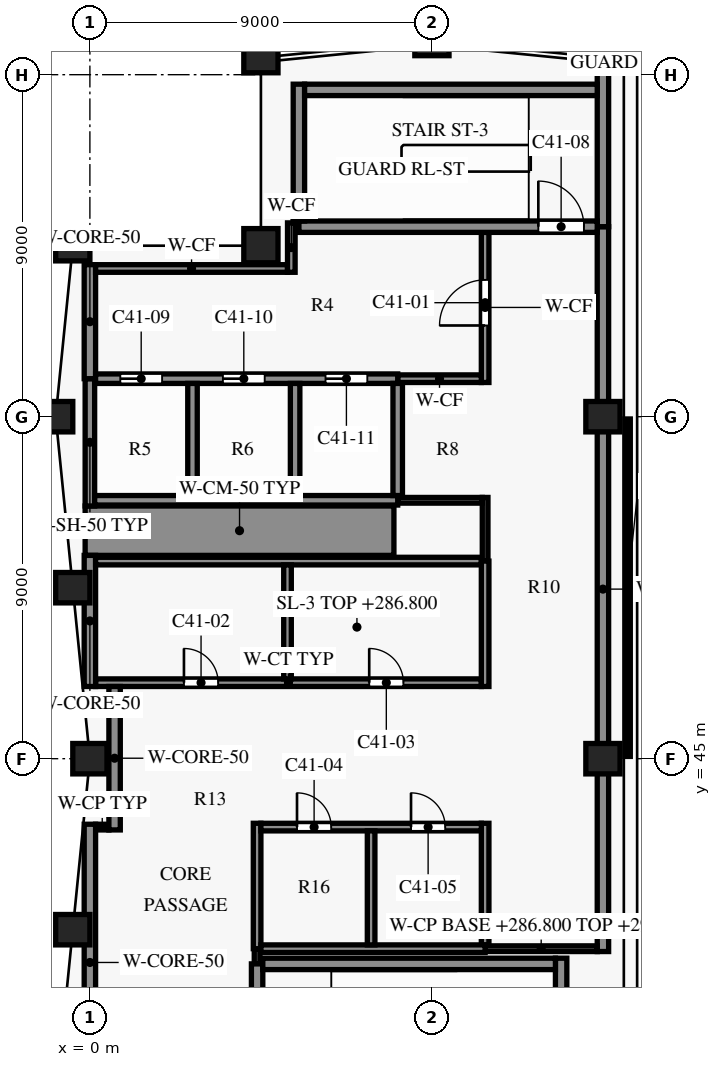
"""IFC4 building model, lengths in metres.
Left out: names, types, materials, properties, quantities, classifications, styles, units other than length and angle.
Written with IfcOpenShell. Run it as: python <this file> out.ifc"""

import sys

from ifc_helpers import new_model, si_unit, direction, frame, frame_2d, origin, origin_2d, place, context, subcontext, project, spatial, rectangle, extrude, element, fill, save


model = new_model("IFC4")
c1 = context("Model", 3, precision=1e-05, world=origin(), true_north=direction((0.0, 1.0)))
c2 = subcontext(c1, "Body", "Model", "MODEL_VIEW")
j1 = project(units=[si_unit("LENGTHUNIT", "METRE"), si_unit("PLANEANGLEUNIT", "RADIAN")], contexts=[c1])
p1 = place(None, origin())
s1 = spatial("IfcSite", under=j1, at=p1, CompositionType="ELEMENT")
p2 = place(p1, origin())
s2 = spatial("IfcBuilding", under=s1, at=p2, CompositionType="ELEMENT")
p3 = place(p2, frame((0.0, 0.0, 286.8)))
s3 = spatial("IfcBuildingStorey", under=s2, at=p3, CompositionType="ELEMENT", Elevation=286.8)
for number, where, z_axis, x_axis in (
    (1, (13.5, 45.0, 0.0), (0.0, 0.0, 1.0), (1.0, 0.0, 0.0)),
    (2, (13.5, 54.0, 0.0), (0.0, 0.0, 1.0), (1.0, 0.0, 0.0)),
    (3, (13.5, 63.45, 0.0), (0.0, 0.0, 1.0), (-0.995, 0.1, 0.0)),
    (4, (9.0, 63.9, 0.0), (0.0, 0.0, 1.0), (-1.0, 0.0, 0.0)),
    (5, (4.5, 63.45, 0.0), (0.0, 0.0, 1.0), (-0.995, -0.1, 0.0)),
    (6, (-0.45, 58.5, 0.0), (0.0, 0.0, 1.0), (-0.1, -0.995, 0.0)),
    (7, (-0.9, 54.0, 0.0), (0.0, 0.0, 1.0), (0.0, -1.0, 0.0)),
    (8, (-0.45, 49.5, 0.0), (0.0, 0.0, 1.0), (0.1, -0.995, 0.0)),
    (9, (0.0, 45.0, 0.0), (0.0, 0.0, 1.0), (0.0, -1.0, 0.0)),
    (10, (-0.45, 40.5, 0.0), (0.0, 0.0, 1.0), (-0.1, -0.995, 0.0)),
):
    element("IfcColumn", number, at=place(p3, frame(where, z_axis=z_axis, x_axis=x_axis)), inside=s3, PredefinedType="COLUMN", context=c2, shape_type="SweptSolid", body=[
        extrude(rectangle(XDim=0.9, YDim=0.8, at=origin_2d()), origin(), (0.0, 0.0, 1.0), 4.0),
    ])
p4 = place(p3, frame((4.5, 58.5, 0.0), z_axis=(0.0, 0.0, 1.0), x_axis=(1.0, 0.0, 0.0)))
e11 = element("IfcColumn", 11, at=p4, inside=s3, PredefinedType="COLUMN", context=c2, shape_type="SweptSolid", body=[
    extrude(rectangle(XDim=0.9, YDim=0.9, at=origin_2d()), origin(), (0.0, 0.0, 1.0), 4.0),
])
p5 = place(p3, frame((4.55, 39.6, 0.0), z_axis=(0.0, 0.0, 1.0), x_axis=(1.0, 0.0, 0.0)))
e12 = element("IfcWall", 12, at=p5, inside=s3, PredefinedType="SHEAR", context=c2, shape_type="SweptSolid", body=[
    extrude(rectangle(XDim=7.7, YDim=0.3, at=frame_2d((3.85, 0.0))), origin(), (0.0, 0.0, 1.0), 3.7),
])
p6 = place(p3, frame((10.4, 40.0, 0.0), z_axis=(0.0, 0.0, 1.0), x_axis=(1.0, 0.0, 0.0)))
e13 = element("IfcWall", 13, at=p6, inside=s3, PredefinedType="PARTITIONING", context=c2, shape_type="SweptSolid", body=[
    extrude(rectangle(XDim=2.95, YDim=0.15, at=frame_2d((1.475, 0.0))), origin(), (0.0, 0.0, 1.0), 3.35),
])
p7 = place(p3, frame((4.5, 40.0, 0.0), z_axis=(0.0, 0.0, 1.0), x_axis=(1.0, 0.0, 0.0)))
e14 = element("IfcWall", 14, at=p7, inside=s3, PredefinedType="PARTITIONING", context=c2, shape_type="SweptSolid", body=[
    extrude(rectangle(XDim=5.9, YDim=0.2, at=frame_2d((2.95, 0.0))), origin(), (0.0, 0.0, 1.0), 3.7),
])
p8 = place(p3, frame((0.15, 43.2, 0.0), z_axis=(0.0, 0.0, 1.0), x_axis=(1.0, 0.0, 0.0)))
e15 = element("IfcWall", 15, at=p8, inside=s3, PredefinedType="PARTITIONING", context=c2, shape_type="SweptSolid", body=[
    extrude(rectangle(XDim=0.35, YDim=0.15, at=frame_2d((0.175, 0.0))), origin(), (0.0, 0.0, 1.0), 3.7),
])
p9 = place(p3, frame((4.5, 43.2, 0.0), z_axis=(0.0, 0.0, 1.0), x_axis=(1.0, 0.0, 0.0)))
e16 = element("IfcWall", 16, at=p9, inside=s3, PredefinedType="PARTITIONING", context=c2, shape_type="SweptSolid", body=[
    extrude(rectangle(XDim=5.8, YDim=0.2, at=frame_2d((2.9, 0.0))), origin(), (0.0, 0.0, 1.0), 3.7),
])
p10 = place(p9, frame((0.95, 0.0, 0.0)))
e17 = element("IfcOpeningElement", 17, at=p10, cuts=e16, PredefinedType="OPENING", context=c2, shape_type="SweptSolid", body=[
    extrude(rectangle(XDim=0.9, YDim=2.1, at=frame_2d((0.45, 1.05))), frame((0.0, 0.11, 0.0), z_axis=(0.0, -1.0, 0.0), x_axis=(1.0, 0.0, 0.0)), (0.0, 0.0, 1.0), 0.22),
])
p11 = place(p9, frame((3.95, 0.0, 0.0)))
e18 = element("IfcOpeningElement", 18, at=p11, cuts=e16, PredefinedType="OPENING", context=c2, shape_type="SweptSolid", body=[
    extrude(rectangle(XDim=0.9, YDim=2.1, at=frame_2d((0.45, 1.05))), frame((0.0, 0.11, 0.0), z_axis=(0.0, -1.0, 0.0), x_axis=(1.0, 0.0, 0.0)), (0.0, 0.0, 1.0), 0.22),
])
p12 = place(p3, frame((0.15, 47.0, 0.0), z_axis=(0.0, 0.0, 1.0), x_axis=(1.0, 0.0, 0.0)))
e19 = element("IfcWall", 19, at=p12, inside=s3, PredefinedType="PARTITIONING", context=c2, shape_type="SweptSolid", body=[
    extrude(rectangle(XDim=10.15, YDim=0.2, at=frame_2d((5.075, 0.0))), origin(), (0.0, 0.0, 1.0), 3.7),
])
p13 = place(p12, frame((2.325, 0.0, 0.0)))
e20 = element("IfcOpeningElement", 20, at=p13, cuts=e19, PredefinedType="OPENING", context=c2, shape_type="SweptSolid", body=[
    extrude(rectangle(XDim=0.9, YDim=2.1, at=frame_2d((0.45, 1.05))), frame((0.0, 0.11, 0.0), z_axis=(0.0, -1.0, 0.0), x_axis=(1.0, 0.0, 0.0)), (0.0, 0.0, 1.0), 0.22),
])
p14 = place(p12, frame((7.2, 0.0, 0.0)))
e21 = element("IfcOpeningElement", 21, at=p14, cuts=e19, PredefinedType="OPENING", context=c2, shape_type="SweptSolid", body=[
    extrude(rectangle(XDim=0.9, YDim=2.1, at=frame_2d((0.45, 1.05))), frame((0.0, 0.11, 0.0), z_axis=(0.0, -1.0, 0.0), x_axis=(1.0, 0.0, 0.0)), (0.0, 0.0, 1.0), 0.22),
])
p15 = place(p3, frame((0.15, 50.2, 0.0), z_axis=(0.0, 0.0, 1.0), x_axis=(1.0, 0.0, 0.0)))
e22 = element("IfcWall", 22, at=p15, inside=s3, PredefinedType="PARTITIONING", context=c2, shape_type="SweptSolid", body=[
    extrude(rectangle(XDim=10.15, YDim=0.2, at=frame_2d((5.075, 0.0))), origin(), (0.0, 0.0, 1.0), 3.7),
])
p16 = place(p3, frame((-0.125, 51.0, 0.0), z_axis=(0.0, 0.0, 1.0), x_axis=(1.0, 0.0, 0.0)))
e23 = element("IfcWall", 23, at=p16, inside=s3, PredefinedType="SHEAR", context=c2, shape_type="SweptSolid", body=[
    extrude(rectangle(XDim=8.125, YDim=1.3, at=frame_2d((4.062, 0.0))), origin(), (0.0, 0.0, 1.0), 3.7),
])
p17 = place(p3, frame((8.1, 51.8, 0.0), z_axis=(0.0, 0.0, 1.0), x_axis=(1.0, 0.0, 0.0)))
e24 = element("IfcWall", 24, at=p17, inside=s3, PredefinedType="PARTITIONING", context=c2, shape_type="SweptSolid", body=[
    extrude(rectangle(XDim=2.225, YDim=0.15, at=frame_2d((1.112, 0.0))), origin(), (0.0, 0.0, 1.0), 3.7),
])
p18 = place(p3, frame((0.125, 51.8, 0.0), z_axis=(0.0, 0.0, 1.0), x_axis=(1.0, 0.0, 0.0)))
e25 = element("IfcWall", 25, at=p18, inside=s3, PredefinedType="SHEAR", context=c2, shape_type="SweptSolid", body=[
    extrude(rectangle(XDim=7.975, YDim=0.25, at=frame_2d((3.988, 0.0))), origin(), (0.0, 0.0, 1.0), 3.7),
])
p19 = place(p3, frame((8.1, 55.0, 0.0), z_axis=(0.0, 0.0, 1.0), x_axis=(1.0, 0.0, 0.0)))
e26 = element("IfcWall", 26, at=p19, inside=s3, PredefinedType="PARTITIONING", context=c2, shape_type="SweptSolid", body=[
    extrude(rectangle(XDim=2.2, YDim=0.2, at=frame_2d((1.1, 0.0))), origin(), (0.0, 0.0, 1.0), 3.7),
])
p20 = place(p3, frame((0.15, 55.0, 0.0), z_axis=(0.0, 0.0, 1.0), x_axis=(1.0, 0.0, 0.0)))
e27 = element("IfcWall", 27, at=p20, inside=s3, PredefinedType="SHEAR", context=c2, shape_type="SweptSolid", body=[
    extrude(rectangle(XDim=7.95, YDim=0.25, at=frame_2d((3.975, 0.0))), origin(), (0.0, 0.0, 1.0), 3.7),
])
p21 = place(p20, frame((0.65, 0.0, 0.0)))
e28 = element("IfcOpeningElement", 28, at=p21, cuts=e27, PredefinedType="OPENING", context=c2, shape_type="SweptSolid", body=[
    extrude(rectangle(XDim=1.1, YDim=2.1, at=frame_2d((0.55, 1.05))), frame((0.0, 0.135, 0.0), z_axis=(0.0, -1.0, 0.0), x_axis=(1.0, 0.0, 0.0)), (0.0, 0.0, 1.0), 0.27),
])
p22 = place(p20, frame((3.35, 0.0, 0.0)))
e29 = element("IfcOpeningElement", 29, at=p22, cuts=e27, PredefinedType="OPENING", context=c2, shape_type="SweptSolid", body=[
    extrude(rectangle(XDim=1.1, YDim=2.1, at=frame_2d((0.55, 1.05))), frame((0.0, 0.135, 0.0), z_axis=(0.0, -1.0, 0.0), x_axis=(1.0, 0.0, 0.0)), (0.0, 0.0, 1.0), 0.27),
])
p23 = place(p20, frame((6.05, 0.0, 0.0)))
e30 = element("IfcOpeningElement", 30, at=p23, cuts=e27, PredefinedType="OPENING", context=c2, shape_type="SweptSolid", body=[
    extrude(rectangle(XDim=1.1, YDim=2.1, at=frame_2d((0.55, 1.05))), frame((0.0, 0.135, 0.0), z_axis=(0.0, -1.0, 0.0), x_axis=(1.0, 0.0, 0.0)), (0.0, 0.0, 1.0), 0.27),
])
p24 = place(p3, frame((0.15, 57.9, 0.0), z_axis=(0.0, 0.0, 1.0), x_axis=(1.0, 0.0, 0.0)))
e31 = element("IfcWall", 31, at=p24, inside=s3, PredefinedType="PARTITIONING", context=c2, shape_type="SweptSolid", body=[
    extrude(rectangle(XDim=5.05, YDim=0.2, at=frame_2d((2.525, 0.0))), origin(), (0.0, 0.0, 1.0), 3.7),
])
p25 = place(p3, frame((5.5, 59.0, 0.0), z_axis=(0.0, 0.0, 1.0), x_axis=(1.0, 0.0, 0.0)))
e32 = element("IfcWall", 32, at=p25, inside=s3, PredefinedType="SHEAR", context=c2, shape_type="SweptSolid", body=[
    extrude(rectangle(XDim=7.85, YDim=0.3, at=frame_2d((3.925, 0.0))), origin(), (0.0, 0.0, 1.0), 3.7),
])
p26 = place(p25, frame((6.3, 0.0, 0.0)))
e33 = element("IfcOpeningElement", 33, at=p26, cuts=e32, PredefinedType="OPENING", context=c2, shape_type="SweptSolid", body=[
    extrude(rectangle(XDim=1.2, YDim=2.2, at=frame_2d((0.6, 1.1))), frame((0.0, 0.16, 0.0), z_axis=(0.0, -1.0, 0.0), x_axis=(1.0, 0.0, 0.0)), (0.0, 0.0, 1.0), 0.32),
])
p27 = place(p3, frame((5.65, 62.6, 0.0), z_axis=(0.0, 0.0, 1.0), x_axis=(1.0, 0.0, 0.0)))
e34 = element("IfcWall", 34, at=p27, inside=s3, PredefinedType="SHEAR", context=c2, shape_type="SweptSolid", body=[
    extrude(rectangle(XDim=7.7, YDim=0.3, at=frame_2d((3.85, 0.0))), origin(), (0.0, 0.0, 1.0), 3.7),
])
p28 = place(p3, frame((0.0, 36.0, 0.0), z_axis=(0.0, 0.0, 1.0), x_axis=(0.0, 1.0, 0.0)))
e35 = element("IfcWall", 35, at=p28, inside=s3, PredefinedType="SHEAR", context=c2, shape_type="SweptSolid", body=[
    extrude(rectangle(XDim=7.275, YDim=0.3, at=frame_2d((3.637, 0.0))), origin(), (0.0, 0.0, 1.0), 3.7),
])
p29 = place(p3, frame((0.0, 46.9, 0.0), z_axis=(0.0, 0.0, 1.0), x_axis=(0.0, 1.0, 0.0)))
e36 = element("IfcWall", 36, at=p29, inside=s3, PredefinedType="SHEAR", context=c2, shape_type="SweptSolid", body=[
    extrude(rectangle(XDim=3.45, YDim=0.3, at=frame_2d((1.725, 0.0))), origin(), (0.0, 0.0, 1.0), 3.7),
])
p30 = place(p3, frame((0.0, 55.0, 0.0), z_axis=(0.0, 0.0, 1.0), x_axis=(0.0, 1.0, 0.0)))
e37 = element("IfcWall", 37, at=p30, inside=s3, PredefinedType="SHEAR", context=c2, shape_type="SweptSolid", body=[
    extrude(rectangle(XDim=3.0, YDim=0.3, at=frame_2d((1.5, 0.0))), origin(), (0.0, 0.0, 1.0), 3.7),
])
p31 = place(p3, frame((0.0, 51.65, 0.0), z_axis=(0.0, 0.0, 1.0), x_axis=(0.0, 1.0, 0.0)))
e38 = element("IfcWall", 38, at=p31, inside=s3, PredefinedType="SHEAR", context=c2, shape_type="SweptSolid", body=[
    extrude(rectangle(XDim=3.35, YDim=0.25, at=frame_2d((1.675, 0.0))), origin(), (0.0, 0.0, 1.0), 3.7),
])
p32 = place(p3, frame((0.65, 43.125, 0.0), z_axis=(0.0, 0.0, 1.0), x_axis=(0.0, 1.0, 0.0)))
e39 = element("IfcWall", 39, at=p32, inside=s3, PredefinedType="SHEAR", context=c2, shape_type="SweptSolid", body=[
    extrude(rectangle(XDim=3.775, YDim=0.3, at=frame_2d((1.887, 0.0))), origin(), (0.0, 0.0, 1.0), 3.7),
])
p33 = place(p3, frame((2.7, 51.925, 0.0), z_axis=(0.0, 0.0, 1.0), x_axis=(0.0, 1.0, 0.0)))
e40 = element("IfcWall", 40, at=p33, inside=s3, PredefinedType="SHEAR", context=c2, shape_type="SweptSolid", body=[
    extrude(rectangle(XDim=2.95, YDim=0.25, at=frame_2d((1.475, 0.0))), origin(), (0.0, 0.0, 1.0), 3.7),
])
p34 = place(p3, frame((4.4, 39.6, 0.0), z_axis=(0.0, 0.0, 1.0), x_axis=(0.0, 1.0, 0.0)))
e41 = element("IfcWall", 41, at=p34, inside=s3, PredefinedType="PARTITIONING", context=c2, shape_type="SweptSolid", body=[
    extrude(rectangle(XDim=0.4, YDim=0.15, at=frame_2d((0.2, 0.0))), origin(), (0.0, 0.0, 1.0), 3.7),
])
p35 = place(p3, frame((4.4, 40.0, 0.0), z_axis=(0.0, 0.0, 1.0), x_axis=(0.0, 1.0, 0.0)))
e42 = element("IfcWall", 42, at=p35, inside=s3, PredefinedType="PARTITIONING", context=c2, shape_type="SweptSolid", body=[
    extrude(rectangle(XDim=3.3, YDim=0.2, at=frame_2d((1.65, 0.0))), origin(), (0.0, 0.0, 1.0), 3.7),
])
p36 = place(p3, frame((4.4, 35.85, 0.0), z_axis=(0.0, 0.0, 1.0), x_axis=(0.0, 1.0, 0.0)))
e43 = element("IfcWall", 43, at=p36, inside=s3, PredefinedType="SHEAR", context=c2, shape_type="SweptSolid", body=[
    extrude(rectangle(XDim=3.75, YDim=0.3, at=frame_2d((1.875, 0.0))), origin(), (0.0, 0.0, 1.0), 3.7),
])
p37 = place(p3, frame((5.2, 47.1, 0.0), z_axis=(0.0, 0.0, 1.0), x_axis=(0.0, 1.0, 0.0)))
e44 = element("IfcWall", 44, at=p37, inside=s3, PredefinedType="PARTITIONING", context=c2, shape_type="SweptSolid", body=[
    extrude(rectangle(XDim=3.0, YDim=0.2, at=frame_2d((1.5, 0.0))), origin(), (0.0, 0.0, 1.0), 3.7),
])
p38 = place(p3, frame((5.3, 57.8, 0.0), z_axis=(0.0, 0.0, 1.0), x_axis=(0.0, 1.0, 0.0)))
e45 = element("IfcWall", 45, at=p38, inside=s3, PredefinedType="PARTITIONING", context=c2, shape_type="SweptSolid", body=[
    extrude(rectangle(XDim=1.3, YDim=0.2, at=frame_2d((0.65, 0.0))), origin(), (0.0, 0.0, 1.0), 3.7),
])
p39 = place(p3, frame((5.4, 51.925, 0.0), z_axis=(0.0, 0.0, 1.0), x_axis=(0.0, 1.0, 0.0)))
e46 = element("IfcWall", 46, at=p39, inside=s3, PredefinedType="SHEAR", context=c2, shape_type="SweptSolid", body=[
    extrude(rectangle(XDim=2.95, YDim=0.25, at=frame_2d((1.475, 0.0))), origin(), (0.0, 0.0, 1.0), 3.7),
])
p40 = place(p3, frame((5.5, 59.15, 0.0), z_axis=(0.0, 0.0, 1.0), x_axis=(0.0, 1.0, 0.0)))
e47 = element("IfcWall", 47, at=p40, inside=s3, PredefinedType="SHEAR", context=c2, shape_type="SweptSolid", body=[
    extrude(rectangle(XDim=3.6, YDim=0.3, at=frame_2d((1.8, 0.0))), origin(), (0.0, 0.0, 1.0), 3.7),
])
p41 = place(p3, frame((7.4, 40.1, 0.0), z_axis=(0.0, 0.0, 1.0), x_axis=(0.0, 1.0, 0.0)))
e48 = element("IfcWall", 48, at=p41, inside=s3, PredefinedType="PARTITIONING", context=c2, shape_type="SweptSolid", body=[
    extrude(rectangle(XDim=3.0, YDim=0.2, at=frame_2d((1.5, 0.0))), origin(), (0.0, 0.0, 1.0), 3.7),
])
p42 = place(p3, frame((8.1, 51.925, 0.0), z_axis=(0.0, 0.0, 1.0), x_axis=(0.0, 1.0, 0.0)))
e49 = element("IfcWall", 49, at=p42, inside=s3, PredefinedType="SHEAR", context=c2, shape_type="SweptSolid", body=[
    extrude(rectangle(XDim=2.95, YDim=0.25, at=frame_2d((1.475, 0.0))), origin(), (0.0, 0.0, 1.0), 3.7),
])
p43 = place(p3, frame((10.4, 54.9, 0.0), z_axis=(0.0, 0.0, 1.0), x_axis=(0.0, 1.0, 0.0)))
e50 = element("IfcWall", 50, at=p43, inside=s3, PredefinedType="PARTITIONING", context=c2, shape_type="SweptSolid", body=[
    extrude(rectangle(XDim=3.95, YDim=0.2, at=frame_2d((1.975, 0.0))), origin(), (0.0, 0.0, 1.0), 3.7),
])
p44 = place(p43, frame((1.5, 0.0, 0.0)))
e51 = element("IfcOpeningElement", 51, at=p44, cuts=e50, PredefinedType="OPENING", context=c2, shape_type="SweptSolid", body=[
    extrude(rectangle(XDim=1.2, YDim=2.2, at=frame_2d((0.6, 1.1))), frame((0.0, 0.11, 0.0), z_axis=(0.0, -1.0, 0.0), x_axis=(1.0, 0.0, 0.0)), (0.0, 0.0, 1.0), 0.22),
])
p45 = place(p3, frame((10.4, 50.2, 0.0), z_axis=(0.0, 0.0, 1.0), x_axis=(0.0, 1.0, 0.0)))
e52 = element("IfcWall", 52, at=p45, inside=s3, PredefinedType="PARTITIONING", context=c2, shape_type="SweptSolid", body=[
    extrude(rectangle(XDim=1.675, YDim=0.15, at=frame_2d((0.837, 0.0))), origin(), (0.0, 0.0, 1.0), 3.7),
])
p46 = place(p3, frame((10.4, 40.1, 0.0), z_axis=(0.0, 0.0, 1.0), x_axis=(0.0, 1.0, 0.0)))
e53 = element("IfcWall", 53, at=p46, inside=s3, PredefinedType="PARTITIONING", context=c2, shape_type="SweptSolid", body=[
    extrude(rectangle(XDim=3.2, YDim=0.2, at=frame_2d((1.6, 0.0))), origin(), (0.0, 0.0, 1.0), 3.7),
])
p47 = place(p3, frame((10.4, 46.9, 0.0), z_axis=(0.0, 0.0, 1.0), x_axis=(0.0, 1.0, 0.0)))
e54 = element("IfcWall", 54, at=p47, inside=s3, PredefinedType="PARTITIONING", context=c2, shape_type="SweptSolid", body=[
    extrude(rectangle(XDim=3.3, YDim=0.2, at=frame_2d((1.65, 0.0))), origin(), (0.0, 0.0, 1.0), 3.7),
])
p48 = place(p3, frame((12.4, 35.85, 0.0), z_axis=(0.0, 0.0, 1.0), x_axis=(0.0, 1.0, 0.0)))
e55 = element("IfcWall", 55, at=p48, inside=s3, PredefinedType="SHEAR", context=c2, shape_type="SweptSolid", body=[
    extrude(rectangle(XDim=3.9, YDim=0.3, at=frame_2d((1.95, 0.0))), origin(), (0.0, 0.0, 1.0), 3.7),
])
p49 = place(p3, frame((13.5, 39.925, 0.0), z_axis=(0.0, 0.0, 1.0), x_axis=(0.0, 1.0, 0.0)))
e56 = element("IfcWall", 56, at=p49, inside=s3, PredefinedType="SHEAR", context=c2, shape_type="SweptSolid", body=[
    extrude(rectangle(XDim=19.075, YDim=0.3, at=frame_2d((9.538, 0.0))), origin(), (0.0, 0.0, 1.0), 3.7),
])
p50 = place(p3, frame((13.5, 59.0, 0.0), z_axis=(0.0, 0.0, 1.0), x_axis=(0.0, 1.0, 0.0)))
e57 = element("IfcWall", 57, at=p50, inside=s3, PredefinedType="SHEAR", context=c2, shape_type="SweptSolid", body=[
    extrude(rectangle(XDim=4.048, YDim=0.3, at=frame_2d((2.024, 0.0))), origin(), (0.0, 0.0, 1.0), 3.7),
])
p51 = place(p44, origin())
e58 = element("IfcDoor", 58, at=p51, inside=s3, OperationType="SINGLE_SWING_RIGHT", PredefinedType="DOOR", context=c2, shape_type="SweptSolid", body=[
    extrude(rectangle(XDim=1.2, YDim=2.2, at=frame_2d((0.6, 1.1))), frame((0.0, 0.025, 0.0), z_axis=(0.0, -1.0, 0.0), x_axis=(1.0, 0.0, 0.0)), (0.0, 0.0, 1.0), 0.05),
])
fill(e51, e58)
p52 = place(p13, origin())
e59 = element("IfcDoor", 59, at=p52, inside=s3, OperationType="SINGLE_SWING_RIGHT", PredefinedType="DOOR", context=c2, shape_type="SweptSolid", body=[
    extrude(rectangle(XDim=0.9, YDim=2.1, at=frame_2d((0.45, 1.05))), frame((0.0, 0.025, 0.0), z_axis=(0.0, -1.0, 0.0), x_axis=(1.0, 0.0, 0.0)), (0.0, 0.0, 1.0), 0.05),
])
fill(e20, e59)
p53 = place(p14, origin())
e60 = element("IfcDoor", 60, at=p53, inside=s3, OperationType="SINGLE_SWING_LEFT", PredefinedType="DOOR", context=c2, shape_type="SweptSolid", body=[
    extrude(rectangle(XDim=0.9, YDim=2.1, at=frame_2d((0.45, 1.05))), frame((0.0, 0.025, 0.0), z_axis=(0.0, -1.0, 0.0), x_axis=(1.0, 0.0, 0.0)), (0.0, 0.0, 1.0), 0.05),
])
fill(e21, e60)
p54 = place(p10, origin())
e61 = element("IfcDoor", 61, at=p54, inside=s3, OperationType="SINGLE_SWING_LEFT", PredefinedType="DOOR", context=c2, shape_type="SweptSolid", body=[
    extrude(rectangle(XDim=0.9, YDim=2.1, at=frame_2d((0.45, 1.05))), frame((0.0, 0.025, 0.0), z_axis=(0.0, -1.0, 0.0), x_axis=(1.0, 0.0, 0.0)), (0.0, 0.0, 1.0), 0.05),
])
fill(e17, e61)
p55 = place(p11, origin())
e62 = element("IfcDoor", 62, at=p55, inside=s3, OperationType="SINGLE_SWING_RIGHT", PredefinedType="DOOR", context=c2, shape_type="SweptSolid", body=[
    extrude(rectangle(XDim=0.9, YDim=2.1, at=frame_2d((0.45, 1.05))), frame((0.0, 0.025, 0.0), z_axis=(0.0, -1.0, 0.0), x_axis=(1.0, 0.0, 0.0)), (0.0, 0.0, 1.0), 0.05),
])
fill(e18, e62)
p56 = place(p26, origin())
e63 = element("IfcDoor", 63, at=p56, inside=s3, OperationType="SINGLE_SWING_RIGHT", PredefinedType="DOOR", context=c2, shape_type="SweptSolid", body=[
    extrude(rectangle(XDim=1.2, YDim=2.2, at=frame_2d((0.6, 1.1))), frame((0.0, 0.025, 0.0), z_axis=(0.0, -1.0, 0.0), x_axis=(1.0, 0.0, 0.0)), (0.0, 0.0, 1.0), 0.05),
])
fill(e33, e63)
p57 = place(p21, origin())
e64 = element("IfcDoor", 64, at=p57, inside=s3, OperationType="DOUBLE_DOOR_SLIDING", PredefinedType="DOOR", context=c2, shape_type="SweptSolid", body=[
    extrude(rectangle(XDim=1.1, YDim=2.1, at=frame_2d((0.55, 1.05))), frame((0.0, 0.025, 0.0), z_axis=(0.0, -1.0, 0.0), x_axis=(1.0, 0.0, 0.0)), (0.0, 0.0, 1.0), 0.05),
])
fill(e28, e64)
p58 = place(p22, origin())
e65 = element("IfcDoor", 65, at=p58, inside=s3, OperationType="DOUBLE_DOOR_SLIDING", PredefinedType="DOOR", context=c2, shape_type="SweptSolid", body=[
    extrude(rectangle(XDim=1.1, YDim=2.1, at=frame_2d((0.55, 1.05))), frame((0.0, 0.025, 0.0), z_axis=(0.0, -1.0, 0.0), x_axis=(1.0, 0.0, 0.0)), (0.0, 0.0, 1.0), 0.05),
])
fill(e29, e65)
p59 = place(p23, origin())
e66 = element("IfcDoor", 66, at=p59, inside=s3, OperationType="DOUBLE_DOOR_SLIDING", PredefinedType="DOOR", context=c2, shape_type="SweptSolid", body=[
    extrude(rectangle(XDim=1.1, YDim=2.1, at=frame_2d((0.55, 1.05))), frame((0.0, 0.025, 0.0), z_axis=(0.0, -1.0, 0.0), x_axis=(1.0, 0.0, 0.0)), (0.0, 0.0, 1.0), 0.05),
])
fill(e30, e66)
save(model, sys.argv[1])
